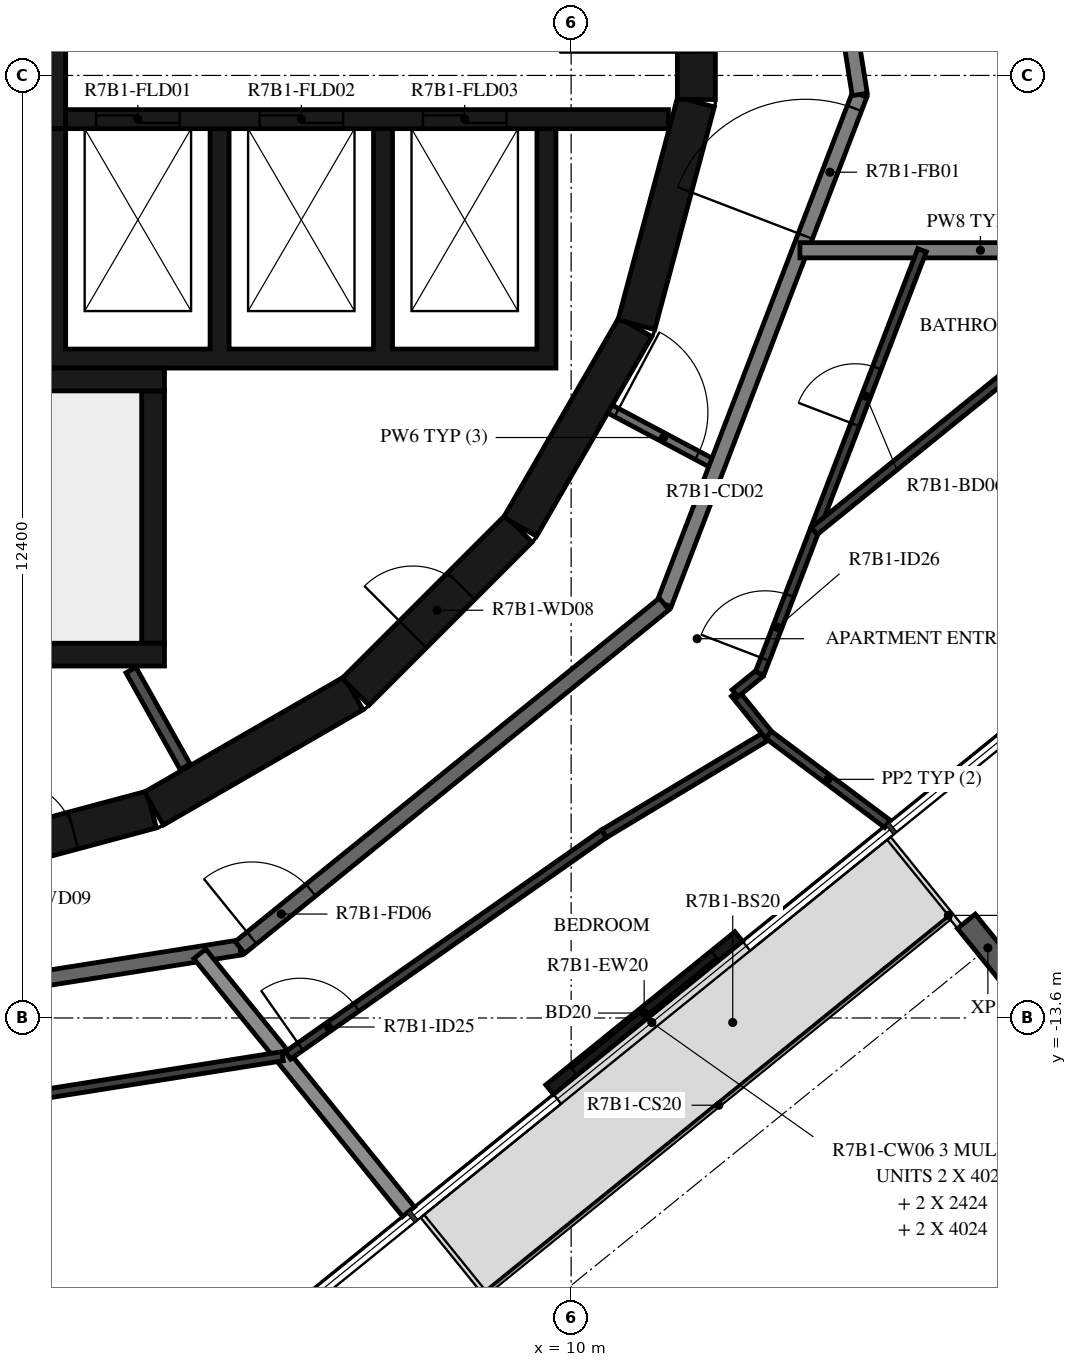
"""IFC4 building model, lengths in metres.
Left out: names, types, materials, properties, quantities, classifications, styles, units other than length and angle.
Written with IfcOpenShell. Run it as: python <this file> out.ifc"""

import sys

from ifc_helpers import new_model, si_unit, direction, frame, frame_2d, origin, origin_2d, place, context, subcontext, project, spatial, polyline, rectangle, i_section, outline, extrude, element, fill, save


model = new_model("IFC4")
c1 = context("Model", 3, precision=1e-05, world=origin(), true_north=direction((0.0, 1.0)))
c2 = subcontext(c1, "Body", "Model", "MODEL_VIEW")
j1 = project(units=[si_unit("LENGTHUNIT", "METRE"), si_unit("PLANEANGLEUNIT", "RADIAN")], contexts=[c1])
p1 = place(None, origin())
s1 = spatial("IfcSite", under=j1, at=p1, CompositionType="ELEMENT")
p2 = place(p1, origin())
s2 = spatial("IfcBuilding", under=s1, at=p2, CompositionType="ELEMENT")
p3 = place(p2, frame((0.0, 0.0, 273.9)))
s3 = spatial("IfcBuildingStorey", under=s2, at=p3, CompositionType="ELEMENT", Elevation=273.9)
p4 = place(p3, frame((15.483, -12.678, -0.38), z_axis=(0.0, 0.0, 1.0), x_axis=(-0.777146167973, -0.629320136024, 0.0)))
e1 = element("IfcColumn", 1, at=p4, inside=s3, PredefinedType="COLUMN", context=c2, shape_type="SweptSolid", body=[
    extrude(i_section(OverallWidth=0.3, OverallDepth=0.9, WebThickness=0.019, FlangeThickness=0.035, FilletRadius=0.03, at=origin_2d()), origin(), (0.0, 0.0, 1.0), 3.5),
])
p5 = place(p3, frame((9.717, -14.542, 0.0), z_axis=(0.0, 0.0, 1.0), x_axis=(0.777125818, 0.629345265333, 0.0)))
e2 = element("IfcWall", 2, at=p5, inside=s3, PredefinedType="STANDARD", context=c2, shape_type="SweptSolid", body=[
    extrude(rectangle(XDim=3.2, YDim=0.16, at=frame_2d((1.6, 0.0))), origin(), (0.0, 0.0, 1.0), 3.12),
])
p6 = place(p5, frame((0.4, 0.0, 0.0)))
e3 = element("IfcOpeningElement", 3, at=p6, cuts=e2, PredefinedType="OPENING", context=c2, shape_type="SweptSolid", body=[
    extrude(rectangle(XDim=2.4, YDim=2.4, at=frame_2d((1.2, 1.2))), frame((0.0, 0.09, 0.0), z_axis=(0.0, -1.0, 0.0), x_axis=(1.0, 0.0, 0.0)), (0.0, 0.0, 1.0), 0.18),
])
p7 = place(p3, frame((1.55, -11.643, 0.0), z_axis=(0.0, 0.0, 1.0), x_axis=(0.965948410781, 0.258734743916, 0.0)))
e4 = element("IfcWall", 4, at=p7, inside=s3, PredefinedType="SHEAR", context=c2, shape_type="SweptSolid", body=[
    extrude(rectangle(XDim=3.033, YDim=0.5, at=frame_2d((1.516, 0.0))), origin(), (0.0, 0.0, 1.0), 3.12),
])
p8 = place(p7, frame((1.066, 0.0, 0.0)))
e5 = element("IfcOpeningElement", 5, at=p8, cuts=e4, PredefinedType="OPENING", context=c2, shape_type="SweptSolid", body=[
    extrude(rectangle(XDim=0.9, YDim=2.1, at=frame_2d((0.45, 1.05))), frame((0.0, 0.26, 0.0), z_axis=(0.0, -1.0, 0.0), x_axis=(1.0, 0.0, 0.0)), (0.0, 0.0, 1.0), 0.52),
])
p9 = place(p3, frame((4.51, -10.845, 0.0), z_axis=(0.0, 0.0, 1.0), x_axis=(0.865975092491, 0.500087131594, 0.0)))
e6 = element("IfcWall", 6, at=p9, inside=s3, PredefinedType="SHEAR", context=c2, shape_type="SweptSolid", body=[
    extrude(rectangle(XDim=3.033, YDim=0.5, at=frame_2d((1.516, 0.0))), origin(), (0.0, 0.0, 1.0), 3.12),
])
p10 = place(p3, frame((7.164, -9.308, 0.0), z_axis=(0.0, 0.0, 1.0), x_axis=(0.707106781187, 0.707106781187, 0.0)))
e7 = element("IfcWall", 7, at=p10, inside=s3, PredefinedType="SHEAR", context=c2, shape_type="SweptSolid", body=[
    extrude(rectangle(XDim=3.032, YDim=0.5, at=frame_2d((1.516, 0.0))), origin(), (0.0, 0.0, 1.0), 3.12),
])
p11 = place(p10, frame((1.066, 0.0, 0.0)))
e8 = element("IfcOpeningElement", 8, at=p11, cuts=e7, PredefinedType="OPENING", context=c2, shape_type="SweptSolid", body=[
    extrude(rectangle(XDim=0.9, YDim=2.1, at=frame_2d((0.45, 1.05))), frame((0.0, 0.26, 0.0), z_axis=(0.0, -1.0, 0.0), x_axis=(1.0, 0.0, 0.0)), (0.0, 0.0, 1.0), 0.52),
])
for number, where, z_axis, x_axis in (
    (9, (9.329, -7.137, 0.0), (0.0, 0.0, 1.0), (0.5, 0.866, 0.0)),
    (10, (10.858, -4.479, 0.0), (0.0, 0.0, 1.0), (0.259, 0.966, 0.0)),
):
    element("IfcWall", number, at=place(p3, frame(where, z_axis=z_axis, x_axis=x_axis)), inside=s3, PredefinedType="SHEAR", context=c2, shape_type="SweptSolid", body=[
        extrude(rectangle(XDim=3.033, YDim=0.5, at=frame_2d((1.516, 0.0))), origin(), (0.0, 0.0, 1.0), 3.12),
    ])
p12 = place(p3, frame((11.647, -1.516, 0.0), z_axis=(0.0, 0.0, 1.0), x_axis=(0.0, 1.0, 0.0)))
e11 = element("IfcWall", 11, at=p12, inside=s3, PredefinedType="SHEAR", context=c2, shape_type="SweptSolid", body=[
    extrude(rectangle(XDim=3.033, YDim=0.5, at=frame_2d((1.516, 0.0))), origin(), (0.0, 0.0, 1.0), 3.12),
])
p13 = place(p12, frame((0.616, 0.0, 0.0)))
e12 = element("IfcOpeningElement", 12, at=p13, cuts=e11, PredefinedType="OPENING", context=c2, shape_type="SweptSolid", body=[
    extrude(rectangle(XDim=1.8, YDim=2.1, at=frame_2d((0.9, 1.05))), frame((0.0, 0.26, 0.0), z_axis=(0.0, -1.0, 0.0), x_axis=(1.0, 0.0, 0.0)), (0.0, 0.0, 1.0), 0.52),
])
p14 = place(p3, frame((-2.4, -5.2, 0.0), z_axis=(0.0, 0.0, 1.0), x_axis=(1.0, 0.0, 0.0)))
e13 = element("IfcWall", 13, at=p14, inside=s3, PredefinedType="SHEAR", context=c2, shape_type="SweptSolid", body=[
    extrude(rectangle(XDim=7.05, YDim=0.3, at=frame_2d((3.525, 0.0))), origin(), (0.0, 0.0, 1.0), 3.12),
])
p15 = place(p3, frame((4.5, -8.67, 0.0), z_axis=(0.0, 0.0, 1.0), x_axis=(0.0, 1.0, 0.0)))
e14 = element("IfcWall", 14, at=p15, inside=s3, PredefinedType="SHEAR", context=c2, shape_type="SweptSolid", body=[
    extrude(rectangle(XDim=3.32, YDim=0.3, at=frame_2d((1.66, 0.0))), origin(), (0.0, 0.0, 1.0), 3.12),
])
p16 = place(p3, frame((0.1, -8.82, 0.0), z_axis=(0.0, 0.0, 1.0), x_axis=(1.0, 0.0, 0.0)))
e15 = element("IfcWall", 15, at=p16, inside=s3, PredefinedType="SHEAR", context=c2, shape_type="SweptSolid", body=[
    extrude(rectangle(XDim=4.55, YDim=0.3, at=frame_2d((2.275, 0.0))), origin(), (0.0, 0.0, 1.0), 3.12),
])
p17 = place(p3, origin())
e16 = element("IfcWall", 16, at=p17, inside=s3, PredefinedType="SHEAR", context=c2, shape_type="SweptSolid", body=[
    extrude(outline(polyline([(9.8, -5.05), (9.8, -4.8), (9.8, -1.9), (9.55, -1.9), (9.55, -4.8), (7.65, -4.8), (7.65, -1.9), (7.4, -1.9), (7.4, -4.8), (5.5, -4.8), (5.5, -1.9), (5.25, -1.9), (5.25, -4.8), (3.35, -4.8), (3.35, -1.9), (3.1, -1.9), (3.1, -4.8), (1.2, -4.8), (1.2, -1.9), (0.95, -1.9), (0.95, -4.8), (-0.95, -4.8), (-0.95, -1.9), (-1.2, -1.9), (-1.2, -4.8), (-3.1, -4.8), (-3.1, -1.9), (-3.35, -1.9), (-3.35, -4.8), (-5.25, -4.8), (-5.25, -1.9), (-5.5, -1.9), (-5.5, -4.8), (-9.55, -4.8), (-9.55, -1.9), (-9.8, -1.9), (-9.8, -4.8), (-9.8, -5.05), (9.8, -5.05)])), origin(), (0.0, 0.0, 1.0), 3.12),
])
p18 = place(p3, frame((3.35, -1.775, 0.0), z_axis=(0.0, 0.0, 1.0), x_axis=(1.0, 0.0, 0.0)))
e17 = element("IfcWall", 17, at=p18, inside=s3, PredefinedType="SHEAR", context=c2, shape_type="SweptSolid", body=[
    extrude(rectangle(XDim=7.93, YDim=0.25, at=frame_2d((3.965, 0.0))), origin(), (0.0, 0.0, 1.0), 3.12),
])
p19 = place(p18, frame((0.4, 0.0, 0.0)))
e18 = element("IfcOpeningElement", 18, at=p19, cuts=e17, PredefinedType="OPENING", context=c2, shape_type="SweptSolid", body=[
    extrude(rectangle(XDim=1.1, YDim=2.4, at=frame_2d((0.55, 1.2))), frame((0.0, 0.135, 0.0), z_axis=(0.0, -1.0, 0.0), x_axis=(1.0, 0.0, 0.0)), (0.0, 0.0, 1.0), 0.27),
])
p20 = place(p18, frame((2.55, 0.0, 0.0)))
e19 = element("IfcOpeningElement", 19, at=p20, cuts=e17, PredefinedType="OPENING", context=c2, shape_type="SweptSolid", body=[
    extrude(rectangle(XDim=1.1, YDim=2.4, at=frame_2d((0.55, 1.2))), frame((0.0, 0.135, 0.0), z_axis=(0.0, -1.0, 0.0), x_axis=(1.0, 0.0, 0.0)), (0.0, 0.0, 1.0), 0.27),
])
p21 = place(p18, frame((4.7, 0.0, 0.0)))
e20 = element("IfcOpeningElement", 20, at=p21, cuts=e17, PredefinedType="OPENING", context=c2, shape_type="SweptSolid", body=[
    extrude(rectangle(XDim=1.1, YDim=2.4, at=frame_2d((0.55, 1.2))), frame((0.0, 0.135, 0.0), z_axis=(0.0, -1.0, 0.0), x_axis=(1.0, 0.0, 0.0)), (0.0, 0.0, 1.0), 0.27),
])
p22 = place(p3, frame((3.225, -1.9, 0.0), z_axis=(0.0, 0.0, 1.0), x_axis=(0.0, 1.0, 0.0)))
e21 = element("IfcWall", 21, at=p22, inside=s3, PredefinedType="SHEAR", context=c2, shape_type="SweptSolid", body=[
    extrude(rectangle(XDim=3.8, YDim=0.25, at=frame_2d((1.9, 0.0))), origin(), (0.0, 0.0, 1.0), 3.12),
])
p23 = place(p3, frame((4.922, -10.296, 0.0), z_axis=(0.0, 0.0, 1.0), x_axis=(-0.48860846254, 0.872503163509, 0.0)))
e22 = element("IfcWall", 22, at=p23, inside=s3, PredefinedType="PARTITIONING", context=c2, shape_type="SweptSolid", body=[
    extrude(rectangle(XDim=1.459, YDim=0.15, at=frame_2d((0.73, 0.0))), origin(), (0.0, 0.0, 1.0), 3.12),
])
p24 = place(p3, frame((10.511, -5.589, 0.0), z_axis=(0.0, 0.0, 1.0), x_axis=(0.882983002821, -0.469404960273, 0.0)))
e23 = element("IfcWall", 23, at=p24, inside=s3, PredefinedType="PARTITIONING", context=c2, shape_type="SweptSolid", body=[
    extrude(rectangle(XDim=1.596, YDim=0.12, at=frame_2d((0.798, 0.0))), origin(), (0.0, 0.0, 1.0), 3.12),
])
p25 = place(p24, frame((0.1, 0.0, 0.0)))
e24 = element("IfcOpeningElement", 24, at=p25, cuts=e23, PredefinedType="OPENING", context=c2, shape_type="SweptSolid", body=[
    extrude(rectangle(XDim=1.2, YDim=2.1, at=frame_2d((0.6, 1.05))), frame((0.0, 0.07, 0.0), z_axis=(0.0, -1.0, 0.0), x_axis=(1.0, 0.0, 0.0)), (0.0, 0.0, 1.0), 0.14),
])
p26 = place(p3, frame((11.223, -8.154, 0.0), z_axis=(0.0, 0.0, 1.0), x_axis=(0.358341090983, 0.93359073609, 0.0)))
e25 = element("IfcWall", 25, at=p26, inside=s3, PredefinedType="STANDARD", context=c2, shape_type="SweptSolid", body=[
    extrude(rectangle(XDim=7.181, YDim=0.2, at=frame_2d((3.59, 0.0))), origin(), (0.0, 0.0, 1.0), 3.12),
])
p27 = place(p26, frame((5.185, 0.0, 0.0)))
e26 = element("IfcOpeningElement", 26, at=p27, cuts=e25, PredefinedType="OPENING", context=c2, shape_type="SweptSolid", body=[
    extrude(rectangle(XDim=1.8, YDim=2.1, at=frame_2d((0.9, 1.05))), frame((0.0, 0.11, 0.0), z_axis=(0.0, -1.0, 0.0), x_axis=(1.0, 0.0, 0.0)), (0.0, 0.0, 1.0), 0.22),
])
p28 = place(p3, frame((13.797, -1.45, 0.0), z_axis=(0.0, 0.0, 1.0), x_axis=(-0.156421704315, 0.987690361611, 0.0)))
e27 = element("IfcWall", 27, at=p28, inside=s3, PredefinedType="STANDARD", context=c2, shape_type="SweptSolid", body=[
    extrude(rectangle(XDim=7.181, YDim=0.2, at=frame_2d((3.591, 0.0))), origin(), (0.0, 0.0, 1.0), 3.12),
])
p29 = place(p3, frame((-1.45, -13.797, 0.0), z_axis=(0.0, 0.0, 1.0), x_axis=(0.987690361611, 0.156421704315, 0.0)))
e28 = element("IfcWall", 28, at=p29, inside=s3, PredefinedType="STANDARD", context=c2, shape_type="SweptSolid", body=[
    extrude(rectangle(XDim=7.181, YDim=0.2, at=frame_2d((3.591, 0.0))), origin(), (0.0, 0.0, 1.0), 3.12),
])
p30 = place(p29, frame((0.2, 0.0, 0.0)))
e29 = element("IfcOpeningElement", 29, at=p30, cuts=e28, PredefinedType="OPENING", context=c2, shape_type="SweptSolid", body=[
    extrude(rectangle(XDim=1.0, YDim=2.1, at=frame_2d((0.5, 1.05))), frame((0.0, 0.11, 0.0), z_axis=(0.0, -1.0, 0.0), x_axis=(1.0, 0.0, 0.0)), (0.0, 0.0, 1.0), 0.22),
])
p31 = place(p3, frame((5.643, -12.673, 0.0), z_axis=(0.0, 0.0, 1.0), x_axis=(0.777160148113, 0.629302871585, 0.0)))
e30 = element("IfcWall", 30, at=p31, inside=s3, PredefinedType="STANDARD", context=c2, shape_type="SweptSolid", body=[
    extrude(rectangle(XDim=7.181, YDim=0.2, at=frame_2d((3.59, 0.0))), origin(), (0.0, 0.0, 1.0), 3.12),
])
p32 = place(p31, frame((0.2, 0.0, 0.0)))
e31 = element("IfcOpeningElement", 31, at=p32, cuts=e30, PredefinedType="OPENING", context=c2, shape_type="SweptSolid", body=[
    extrude(rectangle(XDim=1.0, YDim=2.1, at=frame_2d((0.5, 1.05))), frame((0.0, 0.11, 0.0), z_axis=(0.0, -1.0, 0.0), x_axis=(1.0, 0.0, 0.0)), (0.0, 0.0, 1.0), 0.22),
])
p33 = place(p3, frame((13.01, -3.5, 0.0), z_axis=(0.0, 0.0, 1.0), x_axis=(1.0, 0.0, 0.0)))
e32 = element("IfcWall", 32, at=p33, inside=s3, PredefinedType="STANDARD", context=c2, shape_type="SweptSolid", body=[
    extrude(rectangle(XDim=4.75, YDim=0.2, at=frame_2d((2.375, 0.0))), origin(), (0.0, 0.0, 1.0), 3.12),
])
p34 = place(p3, frame((7.861, -16.148, 0.0), z_axis=(0.0, 0.0, 1.0), x_axis=(-0.629330189513, 0.777138026716, 0.0)))
e33 = element("IfcWall", 33, at=p34, inside=s3, PredefinedType="STANDARD", context=c2, shape_type="SweptSolid", body=[
    extrude(rectangle(XDim=4.364, YDim=0.2, at=frame_2d((2.182, 0.0))), origin(), (0.0, 0.0, 1.0), 2.73),
])
p35 = place(p3, frame((-1.612, -15.341, 0.0), z_axis=(0.0, 0.0, 1.0), x_axis=(0.987687560018, 0.15643939333, 0.0)))
e34 = element("IfcWall", 34, at=p35, inside=s3, PredefinedType="PARTITIONING", context=c2, shape_type="SweptSolid", body=[
    extrude(rectangle(XDim=7.914, YDim=0.12, at=frame_2d((3.957, 0.0))), origin(), (0.0, 0.0, 1.0), 3.12),
])
p36 = place(p35, frame((2.978, 0.0, 0.0)))
e35 = element("IfcOpeningElement", 35, at=p36, cuts=e34, PredefinedType="OPENING", context=c2, shape_type="SweptSolid", body=[
    extrude(rectangle(XDim=0.9, YDim=2.1, at=frame_2d((0.45, 1.05))), frame((0.0, 0.07, 0.0), z_axis=(0.0, -1.0, 0.0), x_axis=(1.0, 0.0, 0.0)), (0.0, 0.0, 1.0), 0.14),
])
p37 = place(p3, frame((6.274, -14.092, 0.0), z_axis=(0.0, 0.0, 1.0), x_axis=(0.818755256003, 0.574142691992, 0.0)))
e36 = element("IfcWall", 36, at=p37, inside=s3, PredefinedType="PARTITIONING", context=c2, shape_type="SweptSolid", body=[
    extrude(rectangle(XDim=5.08, YDim=0.12, at=frame_2d((2.54, 0.0))), origin(), (0.0, 0.0, 1.0), 3.12),
])
p38 = place(p37, frame((0.2, 0.0, 0.0)))
e37 = element("IfcOpeningElement", 37, at=p38, cuts=e36, PredefinedType="OPENING", context=c2, shape_type="SweptSolid", body=[
    extrude(rectangle(XDim=0.9, YDim=2.1, at=frame_2d((0.45, 1.05))), frame((0.0, 0.07, 0.0), z_axis=(0.0, -1.0, 0.0), x_axis=(1.0, 0.0, 0.0)), (0.0, 0.0, 1.0), 0.14),
])
p39 = place(p3, frame((10.434, -11.175, 0.0), z_axis=(0.0, 0.0, 1.0), x_axis=(0.857117202926, 0.515121442427, 0.0)))
e38 = element("IfcWall", 38, at=p39, inside=s3, PredefinedType="PARTITIONING", context=c2, shape_type="SweptSolid", body=[
    extrude(rectangle(XDim=2.524, YDim=0.12, at=frame_2d((1.262, 0.0))), origin(), (0.0, 0.0, 1.0), 3.12),
])
p40 = place(p3, frame((12.597, -9.875, 0.0), z_axis=(0.0, 0.0, 1.0), x_axis=(-0.629138198612, 0.77729346263, 0.0)))
e39 = element("IfcWall", 39, at=p40, inside=s3, PredefinedType="PARTITIONING", context=c2, shape_type="SweptSolid", body=[
    extrude(rectangle(XDim=0.702, YDim=0.12, at=frame_2d((0.351, 0.0))), origin(), (0.0, 0.0, 1.0), 3.12),
])
p41 = place(p3, frame((12.156, -9.329, 0.0), z_axis=(0.0, 0.0, 1.0), x_axis=(0.777026645941, 0.629467704888, 0.0)))
e40 = element("IfcWall", 40, at=p41, inside=s3, PredefinedType="PARTITIONING", context=c2, shape_type="SweptSolid", body=[
    extrude(rectangle(XDim=0.417, YDim=0.12, at=frame_2d((0.208, 0.0))), origin(), (0.0, 0.0, 1.0), 3.12),
])
p42 = place(p3, frame((12.479, -9.067, 0.0), z_axis=(0.0, 0.0, 1.0), x_axis=(0.358372669661, 0.933578614601, 0.0)))
e41 = element("IfcWall", 41, at=p42, inside=s3, PredefinedType="PARTITIONING", context=c2, shape_type="SweptSolid", body=[
    extrude(rectangle(XDim=5.963, YDim=0.12, at=frame_2d((2.981, 0.0))), origin(), (0.0, 0.0, 1.0), 3.12),
])
p43 = place(p42, frame((0.2, 0.0, 0.0)))
e42 = element("IfcOpeningElement", 42, at=p43, cuts=e41, PredefinedType="OPENING", context=c2, shape_type="SweptSolid", body=[
    extrude(rectangle(XDim=0.9, YDim=2.1, at=frame_2d((0.45, 1.05))), frame((0.0, 0.07, 0.0), z_axis=(0.0, -1.0, 0.0), x_axis=(1.0, 0.0, 0.0)), (0.0, 0.0, 1.0), 0.14),
])
p44 = place(p42, frame((3.507, 0.0, 0.0)))
e43 = element("IfcOpeningElement", 43, at=p44, cuts=e41, PredefinedType="OPENING", context=c2, shape_type="SweptSolid", body=[
    extrude(rectangle(XDim=0.8, YDim=2.1, at=frame_2d((0.4, 1.05))), frame((0.0, 0.07, 0.0), z_axis=(0.0, -1.0, 0.0), x_axis=(1.0, 0.0, 0.0)), (0.0, 0.0, 1.0), 0.14),
])
p45 = place(p3, frame((14.161, -11.046, 0.0), z_axis=(0.0, 0.0, 1.0), x_axis=(-0.800434550749, 0.599420161463, 0.0)))
e44 = element("IfcWall", 44, at=p45, inside=s3, PredefinedType="PARTITIONING", context=c2, shape_type="SweptSolid", body=[
    extrude(rectangle(XDim=1.954, YDim=0.12, at=frame_2d((0.977, 0.0))), origin(), (0.0, 0.0, 1.0), 2.73),
])
p46 = place(p3, frame((17.76, -3.5, 0.0), z_axis=(0.0, 0.0, 1.0), x_axis=(-0.777133455716, -0.62933583404, 0.0)))
e45 = element("IfcWall", 45, at=p46, inside=s3, PredefinedType="PARTITIONING", context=c2, shape_type="SweptSolid", body=[
    extrude(rectangle(XDim=5.869, YDim=0.12, at=frame_2d((2.935, 0.0))), origin(), (0.0, 0.0, 1.0), 3.12),
])
p47 = place(p6, origin())
e46 = element("IfcDoor", 46, at=p47, inside=s3, OperationType="DOUBLE_DOOR_SLIDING", PredefinedType="DOOR", context=c2, shape_type="SweptSolid", body=[
    extrude(rectangle(XDim=2.4, YDim=2.4, at=frame_2d((1.2, 1.2))), frame((0.0, 0.025, 0.0), z_axis=(0.0, -1.0, 0.0), x_axis=(1.0, 0.0, 0.0)), (0.0, 0.0, 1.0), 0.05),
])
fill(e3, e46)
p48 = place(p13, origin())
e47 = element("IfcDoor", 47, at=p48, inside=s3, OperationType="DOUBLE_DOOR_SINGLE_SWING", PredefinedType="DOOR", context=c2, shape_type="SweptSolid", body=[
    extrude(rectangle(XDim=1.8, YDim=2.1, at=frame_2d((0.9, 1.05))), frame((0.0, 0.025, 0.0), z_axis=(0.0, -1.0, 0.0), x_axis=(1.0, 0.0, 0.0)), (0.0, 0.0, 1.0), 0.05),
])
fill(e12, e47)
p49 = place(p19, origin())
e48 = element("IfcDoor", 48, at=p49, inside=s3, OperationType="DOUBLE_DOOR_SLIDING", PredefinedType="DOOR", context=c2, shape_type="SweptSolid", body=[
    extrude(rectangle(XDim=1.1, YDim=2.4, at=frame_2d((0.55, 1.2))), frame((0.0, 0.025, 0.0), z_axis=(0.0, -1.0, 0.0), x_axis=(1.0, 0.0, 0.0)), (0.0, 0.0, 1.0), 0.05),
])
fill(e18, e48)
p50 = place(p20, origin())
e49 = element("IfcDoor", 49, at=p50, inside=s3, OperationType="DOUBLE_DOOR_SLIDING", PredefinedType="DOOR", context=c2, shape_type="SweptSolid", body=[
    extrude(rectangle(XDim=1.1, YDim=2.4, at=frame_2d((0.55, 1.2))), frame((0.0, 0.025, 0.0), z_axis=(0.0, -1.0, 0.0), x_axis=(1.0, 0.0, 0.0)), (0.0, 0.0, 1.0), 0.05),
])
fill(e19, e49)
p51 = place(p21, origin())
e50 = element("IfcDoor", 50, at=p51, inside=s3, OperationType="DOUBLE_DOOR_SLIDING", PredefinedType="DOOR", context=c2, shape_type="SweptSolid", body=[
    extrude(rectangle(XDim=1.1, YDim=2.4, at=frame_2d((0.55, 1.2))), frame((0.0, 0.025, 0.0), z_axis=(0.0, -1.0, 0.0), x_axis=(1.0, 0.0, 0.0)), (0.0, 0.0, 1.0), 0.05),
])
fill(e20, e50)
p52 = place(p11, origin())
e51 = element("IfcDoor", 51, at=p52, inside=s3, OperationType="SINGLE_SWING_RIGHT", PredefinedType="DOOR", context=c2, shape_type="SweptSolid", body=[
    extrude(rectangle(XDim=0.9, YDim=2.1, at=frame_2d((0.45, 1.05))), frame((0.0, 0.025, 0.0), z_axis=(0.0, -1.0, 0.0), x_axis=(1.0, 0.0, 0.0)), (0.0, 0.0, 1.0), 0.05),
])
fill(e8, e51)
p53 = place(p8, origin())
e52 = element("IfcDoor", 52, at=p53, inside=s3, OperationType="SINGLE_SWING_LEFT", PredefinedType="DOOR", context=c2, shape_type="SweptSolid", body=[
    extrude(rectangle(XDim=0.9, YDim=2.1, at=frame_2d((0.45, 1.05))), frame((0.0, 0.025, 0.0), z_axis=(0.0, -1.0, 0.0), x_axis=(1.0, 0.0, 0.0)), (0.0, 0.0, 1.0), 0.05),
])
fill(e5, e52)
p54 = place(p32, origin())
e53 = element("IfcDoor", 53, at=p54, inside=s3, OperationType="SINGLE_SWING_LEFT", PredefinedType="DOOR", context=c2, shape_type="SweptSolid", body=[
    extrude(rectangle(XDim=1.0, YDim=2.1, at=frame_2d((0.5, 1.05))), frame((0.0, 0.025, 0.0), z_axis=(0.0, -1.0, 0.0), x_axis=(1.0, 0.0, 0.0)), (0.0, 0.0, 1.0), 0.05),
])
fill(e31, e53)
p55 = place(p38, origin())
e54 = element("IfcDoor", 54, at=p55, inside=s3, OperationType="SINGLE_SWING_LEFT", PredefinedType="DOOR", context=c2, shape_type="SweptSolid", body=[
    extrude(rectangle(XDim=0.9, YDim=2.1, at=frame_2d((0.45, 1.05))), frame((0.0, 0.025, 0.0), z_axis=(0.0, -1.0, 0.0), x_axis=(1.0, 0.0, 0.0)), (0.0, 0.0, 1.0), 0.05),
])
fill(e37, e54)
p56 = place(p43, origin())
e55 = element("IfcDoor", 55, at=p56, inside=s3, OperationType="SINGLE_SWING_RIGHT", PredefinedType="DOOR", context=c2, shape_type="SweptSolid", body=[
    extrude(rectangle(XDim=0.9, YDim=2.1, at=frame_2d((0.45, 1.05))), frame((0.0, 0.025, 0.0), z_axis=(0.0, -1.0, 0.0), x_axis=(1.0, 0.0, 0.0)), (0.0, 0.0, 1.0), 0.05),
])
fill(e42, e55)
p57 = place(p44, origin())
e56 = element("IfcDoor", 56, at=p57, inside=s3, OperationType="SINGLE_SWING_RIGHT", PredefinedType="DOOR", context=c2, shape_type="SweptSolid", body=[
    extrude(rectangle(XDim=0.8, YDim=2.1, at=frame_2d((0.4, 1.05))), frame((0.0, 0.025, 0.0), z_axis=(0.0, -1.0, 0.0), x_axis=(1.0, 0.0, 0.0)), (0.0, 0.0, 1.0), 0.05),
])
fill(e43, e56)
p58 = place(p25, origin())
e57 = element("IfcDoor", 57, at=p58, inside=s3, OperationType="DOUBLE_DOOR_SINGLE_SWING", PredefinedType="DOOR", context=c2, shape_type="SweptSolid", body=[
    extrude(rectangle(XDim=1.2, YDim=2.1, at=frame_2d((0.6, 1.05))), frame((0.0, 0.025, 0.0), z_axis=(0.0, -1.0, 0.0), x_axis=(1.0, 0.0, 0.0)), (0.0, 0.0, 1.0), 0.05),
])
fill(e24, e57)
p59 = place(p27, origin())
e58 = element("IfcDoor", 58, at=p59, inside=s3, OperationType="DOUBLE_DOOR_SINGLE_SWING", PredefinedType="DOOR", context=c2, shape_type="SweptSolid", body=[
    extrude(rectangle(XDim=1.8, YDim=2.1, at=frame_2d((0.9, 1.05))), frame((0.0, 0.025, 0.0), z_axis=(0.0, -1.0, 0.0), x_axis=(1.0, 0.0, 0.0)), (0.0, 0.0, 1.0), 0.05),
])
fill(e26, e58)
save(model, sys.argv[1])
